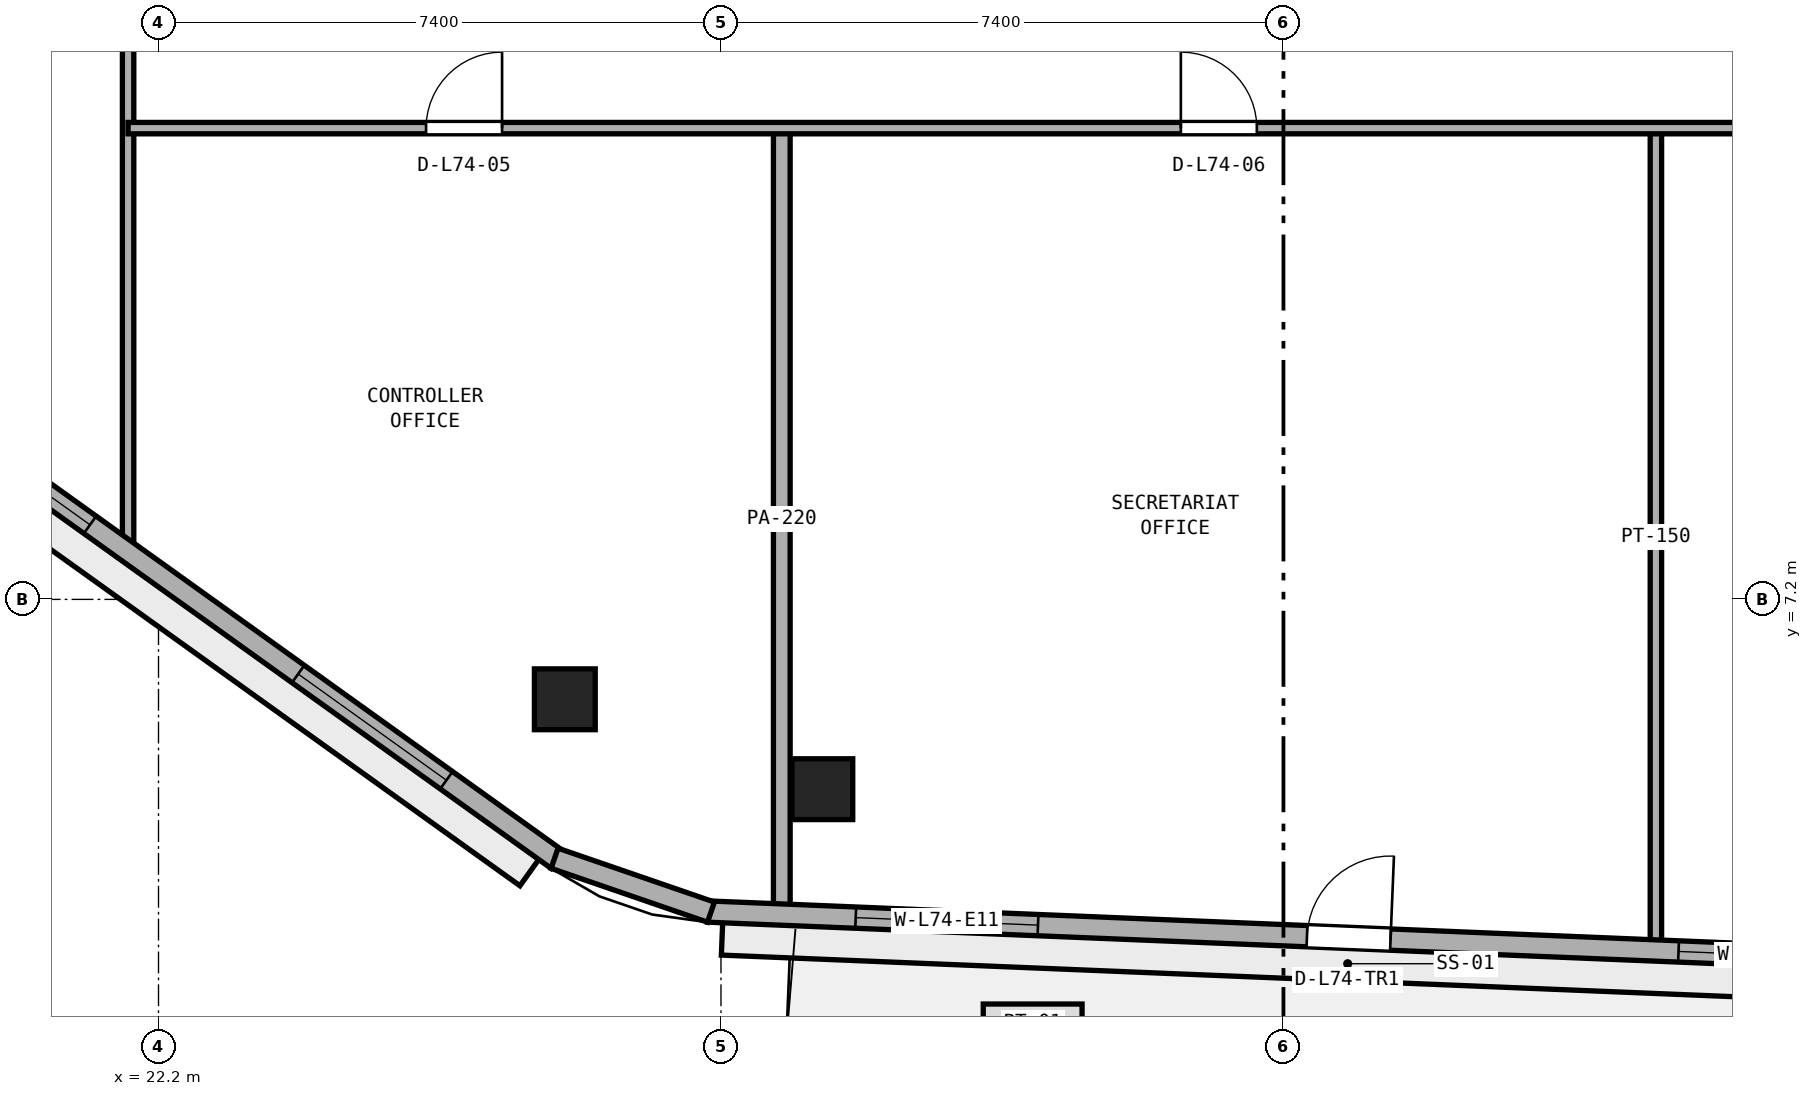
"""IFC4 building model, lengths in metres.
Left out: names, types, materials, properties, quantities, classifications, styles, units other than length and angle.
Written with IfcOpenShell. Run it as: python <this file> out.ifc"""

import sys

from ifc_helpers import new_model, si_unit, direction, frame, frame_2d, origin, origin_2d, place, context, subcontext, project, spatial, rectangle, extrude, element, fill, save


model = new_model("IFC4")
c1 = context("Model", 3, precision=1e-05, world=origin(), true_north=direction((0.0, 1.0)))
c2 = subcontext(c1, "Body", "Model", "MODEL_VIEW")
j1 = project(units=[si_unit("LENGTHUNIT", "METRE"), si_unit("PLANEANGLEUNIT", "RADIAN")], contexts=[c1])
p1 = place(None, origin())
s1 = spatial("IfcSite", under=j1, at=p1, CompositionType="ELEMENT")
p2 = place(p1, origin())
s2 = spatial("IfcBuilding", under=s1, at=p2, CompositionType="ELEMENT")
p3 = place(p2, frame((0.0, 0.0, 289.6)))
s3 = spatial("IfcBuildingStorey", under=s2, at=p3, CompositionType="ELEMENT", Elevation=289.6)
for number, where, z_axis, x_axis in (
    (1, (30.934, 4.703, 0.0), (0.0, 0.0, 1.0), (1.0, 0.0, 0.0)),
    (2, (27.545, 5.886, 0.0), (0.0, 0.0, 1.0), (1.0, 0.0, 0.0)),
):
    element("IfcColumn", number, at=place(p3, frame(where, z_axis=z_axis, x_axis=x_axis)), inside=s3, PredefinedType="COLUMN", context=c2, shape_type="SweptSolid", body=[
        extrude(rectangle(XDim=0.8, YDim=0.8, at=origin_2d()), origin(), (0.0, 0.0, 1.0), 3.8),
    ])
p4 = place(p3, frame((41.9, 2.646, 0.0), z_axis=(0.0, 0.0, 1.0), x_axis=(0.0, 1.0, 0.0)))
e3 = element("IfcWall", 3, at=p4, inside=s3, PredefinedType="PARTITIONING", context=c2, shape_type="SweptSolid", body=[
    extrude(rectangle(XDim=10.754, YDim=0.15, at=frame_2d((5.377, 0.0))), origin(), (0.0, 0.0, 1.0), 3.54),
])
p5 = place(p3, frame((30.4, 3.118, 0.0), z_axis=(0.0, 0.0, 1.0), x_axis=(0.0, 1.0, 0.0)))
e4 = element("IfcWall", 4, at=p5, inside=s3, PredefinedType="PARTITIONING", context=c2, shape_type="SweptSolid", body=[
    extrude(rectangle(XDim=10.282, YDim=0.22, at=frame_2d((5.141, 0.0))), origin(), (0.0, 0.0, 1.0), 3.54),
])
p6 = place(p3, frame((21.8, 7.79, 0.0), z_axis=(0.0, 0.0, 1.0), x_axis=(0.0, 1.0, 0.0)))
e5 = element("IfcWall", 5, at=p6, inside=s3, PredefinedType="PARTITIONING", context=c2, shape_type="SweptSolid", body=[
    extrude(rectangle(XDim=29.21, YDim=0.15, at=frame_2d((14.605, 0.0))), origin(), (0.0, 0.0, 1.0), 3.54),
])
p7 = place(p6, frame((9.76, 0.0, 0.0)))
e6 = element("IfcOpeningElement", 6, at=p7, cuts=e5, PredefinedType="OPENING", context=c2, shape_type="SweptSolid", body=[
    extrude(rectangle(XDim=0.9, YDim=2.1, at=frame_2d((0.45, 1.05))), frame((0.0, 0.085, 0.0), z_axis=(0.0, -1.0, 0.0), x_axis=(1.0, 0.0, 0.0)), (0.0, 0.0, 1.0), 0.17),
])
p8 = place(p6, frame((18.11, 0.0, 0.0)))
e7 = element("IfcOpeningElement", 7, at=p8, cuts=e5, PredefinedType="OPENING", context=c2, shape_type="SweptSolid", body=[
    extrude(rectangle(XDim=0.9, YDim=2.1, at=frame_2d((0.45, 1.05))), frame((0.0, 0.085, 0.0), z_axis=(0.0, -1.0, 0.0), x_axis=(1.0, 0.0, 0.0)), (0.0, 0.0, 1.0), 0.17),
])
p9 = place(p6, frame((23.485, 0.0, 0.0)))
e8 = element("IfcOpeningElement", 8, at=p9, cuts=e5, PredefinedType="OPENING", context=c2, shape_type="SweptSolid", body=[
    extrude(rectangle(XDim=0.9, YDim=2.1, at=frame_2d((0.45, 1.05))), frame((0.0, 0.085, 0.0), z_axis=(0.0, -1.0, 0.0), x_axis=(1.0, 0.0, 0.0)), (0.0, 0.0, 1.0), 0.17),
])
p10 = place(p3, frame((21.8, 13.4, 0.0), z_axis=(0.0, 0.0, 1.0), x_axis=(1.0, 0.0, 0.0)))
e9 = element("IfcWall", 9, at=p10, inside=s3, PredefinedType="PARTITIONING", context=c2, shape_type="SweptSolid", body=[
    extrude(rectangle(XDim=26.8, YDim=0.15, at=frame_2d((13.4, 0.0))), origin(), (0.0, 0.0, 1.0), 3.54),
])
p11 = place(p10, frame((3.92, 0.0, 0.0)))
e10 = element("IfcOpeningElement", 10, at=p11, cuts=e9, PredefinedType="OPENING", context=c2, shape_type="SweptSolid", body=[
    extrude(rectangle(XDim=1.0, YDim=2.12, at=frame_2d((0.5, 1.06))), frame((0.0, 0.085, 0.0), z_axis=(0.0, -1.0, 0.0), x_axis=(1.0, 0.0, 0.0)), (0.0, 0.0, 1.0), 0.17),
])
p12 = place(p10, frame((13.85, 0.0, 0.0)))
e11 = element("IfcOpeningElement", 11, at=p12, cuts=e9, PredefinedType="OPENING", context=c2, shape_type="SweptSolid", body=[
    extrude(rectangle(XDim=1.0, YDim=2.12, at=frame_2d((0.5, 1.06))), frame((0.0, 0.085, 0.0), z_axis=(0.0, -1.0, 0.0), x_axis=(1.0, 0.0, 0.0)), (0.0, 0.0, 1.0), 0.17),
])
p13 = place(p10, frame((22.88, 0.0, 0.0)))
e12 = element("IfcOpeningElement", 12, at=p13, cuts=e9, PredefinedType="OPENING", context=c2, shape_type="SweptSolid", body=[
    extrude(rectangle(XDim=0.9, YDim=2.1, at=frame_2d((0.45, 1.05))), frame((0.0, 0.085, 0.0), z_axis=(0.0, -1.0, 0.0), x_axis=(1.0, 0.0, 0.0)), (0.0, 0.0, 1.0), 0.17),
])
p14 = place(p3, frame((29.428, 3.093, 0.0), z_axis=(0.0, 0.0, 1.0), x_axis=(0.999156257967, -0.041070331944, 0.0)))
e13 = element("IfcWall", 13, at=p14, inside=s3, PredefinedType="STANDARD", context=c2, shape_type="SweptSolid", body=[
    extrude(rectangle(XDim=16.876, YDim=0.28, at=frame_2d((8.438, 0.0))), origin(), (0.0, 0.0, 1.0), 3.54),
])
p15 = place(p14, frame((7.888, 0.0, 0.0)))
e14 = element("IfcOpeningElement", 14, at=p15, cuts=e13, PredefinedType="OPENING", context=c2, shape_type="SweptSolid", body=[
    extrude(rectangle(XDim=1.1, YDim=2.2, at=frame_2d((0.55, 1.1))), frame((0.0, 0.15, 0.0), z_axis=(0.0, -1.0, 0.0), x_axis=(1.0, 0.0, 0.0)), (0.0, 0.0, 1.0), 0.3),
])
p16 = place(p14, frame((1.946, 0.0, 0.9)))
e15 = element("IfcOpeningElement", 15, at=p16, cuts=e13, PredefinedType="OPENING", context=c2, shape_type="SweptSolid", body=[
    extrude(rectangle(XDim=2.4, YDim=1.75, at=frame_2d((1.2, 0.875))), frame((0.0, 0.15, 0.0), z_axis=(0.0, -1.0, 0.0), x_axis=(1.0, 0.0, 0.0)), (0.0, 0.0, 1.0), 0.3),
])
p17 = place(p14, frame((12.78, 0.0, 0.9)))
e16 = element("IfcOpeningElement", 16, at=p17, cuts=e13, PredefinedType="OPENING", context=c2, shape_type="SweptSolid", body=[
    extrude(rectangle(XDim=2.4, YDim=1.75, at=frame_2d((1.2, 0.875))), frame((0.0, 0.15, 0.0), z_axis=(0.0, -1.0, 0.0), x_axis=(1.0, 0.0, 0.0)), (0.0, 0.0, 1.0), 0.3),
])
p18 = place(p3, frame((14.468, 13.077, 0.0), z_axis=(0.0, 0.0, 1.0), x_axis=(0.812809888039, -0.582529042972, 0.0)))
e17 = element("IfcWall", 17, at=p18, inside=s3, PredefinedType="STANDARD", context=c2, shape_type="SweptSolid", body=[
    extrude(rectangle(XDim=15.968, YDim=0.28, at=frame_2d((7.984, 0.0))), origin(), (0.0, 0.0, 1.0), 3.54),
])
p19 = place(p18, frame((1.795, 0.0, 0.9)))
e18 = element("IfcOpeningElement", 18, at=p19, cuts=e17, PredefinedType="OPENING", context=c2, shape_type="SweptSolid", body=[
    extrude(rectangle(XDim=2.4, YDim=1.75, at=frame_2d((1.2, 0.875))), frame((0.0, 0.15, 0.0), z_axis=(0.0, -1.0, 0.0), x_axis=(1.0, 0.0, 0.0)), (0.0, 0.0, 1.0), 0.3),
])
p20 = place(p18, frame((6.004, 0.0, 0.9)))
e19 = element("IfcOpeningElement", 19, at=p20, cuts=e17, PredefinedType="OPENING", context=c2, shape_type="SweptSolid", body=[
    extrude(rectangle(XDim=2.4, YDim=1.75, at=frame_2d((1.2, 0.875))), frame((0.0, 0.15, 0.0), z_axis=(0.0, -1.0, 0.0), x_axis=(1.0, 0.0, 0.0)), (0.0, 0.0, 1.0), 0.3),
])
p21 = place(p18, frame((11.773, 0.0, 0.9)))
e20 = element("IfcOpeningElement", 20, at=p21, cuts=e17, PredefinedType="OPENING", context=c2, shape_type="SweptSolid", body=[
    extrude(rectangle(XDim=2.4, YDim=1.75, at=frame_2d((1.2, 0.875))), frame((0.0, 0.15, 0.0), z_axis=(0.0, -1.0, 0.0), x_axis=(1.0, 0.0, 0.0)), (0.0, 0.0, 1.0), 0.3),
])
p22 = place(p3, frame((27.411, 3.794, 0.0), z_axis=(0.0, 0.0, 1.0), x_axis=(0.945552869008, -0.325468542121, 0.0)))
e21 = element("IfcWall", 21, at=p22, inside=s3, PredefinedType="STANDARD", context=c2, shape_type="SweptSolid", body=[
    extrude(rectangle(XDim=2.176, YDim=0.28, at=frame_2d((1.088, 0.0))), origin(), (0.0, 0.0, 1.0), 3.54),
])
p23 = place(p11, origin())
e22 = element("IfcDoor", 22, at=p23, inside=s3, OperationType="SINGLE_SWING_RIGHT", PredefinedType="DOOR", context=c2, shape_type="SweptSolid", body=[
    extrude(rectangle(XDim=1.0, YDim=2.12, at=frame_2d((0.5, 1.06))), frame((0.0, 0.025, 0.0), z_axis=(0.0, -1.0, 0.0), x_axis=(1.0, 0.0, 0.0)), (0.0, 0.0, 1.0), 0.05),
])
fill(e10, e22)
p24 = place(p12, origin())
e23 = element("IfcDoor", 23, at=p24, inside=s3, OperationType="SINGLE_SWING_LEFT", PredefinedType="DOOR", context=c2, shape_type="SweptSolid", body=[
    extrude(rectangle(XDim=1.0, YDim=2.12, at=frame_2d((0.5, 1.06))), frame((0.0, 0.025, 0.0), z_axis=(0.0, -1.0, 0.0), x_axis=(1.0, 0.0, 0.0)), (0.0, 0.0, 1.0), 0.05),
])
fill(e11, e23)
p25 = place(p15, origin())
e24 = element("IfcDoor", 24, at=p25, inside=s3, OperationType="SINGLE_SWING_RIGHT", PredefinedType="DOOR", context=c2, shape_type="SweptSolid", body=[
    extrude(rectangle(XDim=1.1, YDim=2.2, at=frame_2d((0.55, 1.1))), frame((0.0, 0.025, 0.0), z_axis=(0.0, -1.0, 0.0), x_axis=(1.0, 0.0, 0.0)), (0.0, 0.0, 1.0), 0.05),
])
fill(e14, e24)
p26 = place(p16, origin())
e25 = element("IfcWindow", 25, at=p26, inside=s3, PartitioningType="SINGLE_PANEL", PredefinedType="WINDOW", context=c2, shape_type="SweptSolid", body=[
    extrude(rectangle(XDim=2.4, YDim=1.75, at=frame_2d((1.2, 0.875))), frame((0.0, 0.03, 0.0), z_axis=(0.0, -1.0, 0.0), x_axis=(1.0, 0.0, 0.0)), (0.0, 0.0, 1.0), 0.06),
])
fill(e15, e25)
p27 = place(p17, origin())
e26 = element("IfcWindow", 26, at=p27, inside=s3, PartitioningType="SINGLE_PANEL", PredefinedType="WINDOW", context=c2, shape_type="SweptSolid", body=[
    extrude(rectangle(XDim=2.4, YDim=1.75, at=frame_2d((1.2, 0.875))), frame((0.0, 0.03, 0.0), z_axis=(0.0, -1.0, 0.0), x_axis=(1.0, 0.0, 0.0)), (0.0, 0.0, 1.0), 0.06),
])
fill(e16, e26)
p28 = place(p20, origin())
e27 = element("IfcWindow", 27, at=p28, inside=s3, PartitioningType="SINGLE_PANEL", PredefinedType="WINDOW", context=c2, shape_type="SweptSolid", body=[
    extrude(rectangle(XDim=2.4, YDim=1.75, at=frame_2d((1.2, 0.875))), frame((0.0, 0.03, 0.0), z_axis=(0.0, -1.0, 0.0), x_axis=(1.0, 0.0, 0.0)), (0.0, 0.0, 1.0), 0.06),
])
fill(e19, e27)
p29 = place(p21, origin())
e28 = element("IfcWindow", 28, at=p29, inside=s3, PartitioningType="SINGLE_PANEL", PredefinedType="WINDOW", context=c2, shape_type="SweptSolid", body=[
    extrude(rectangle(XDim=2.4, YDim=1.75, at=frame_2d((1.2, 0.875))), frame((0.0, 0.03, 0.0), z_axis=(0.0, -1.0, 0.0), x_axis=(1.0, 0.0, 0.0)), (0.0, 0.0, 1.0), 0.06),
])
fill(e20, e28)
save(model, sys.argv[1])
